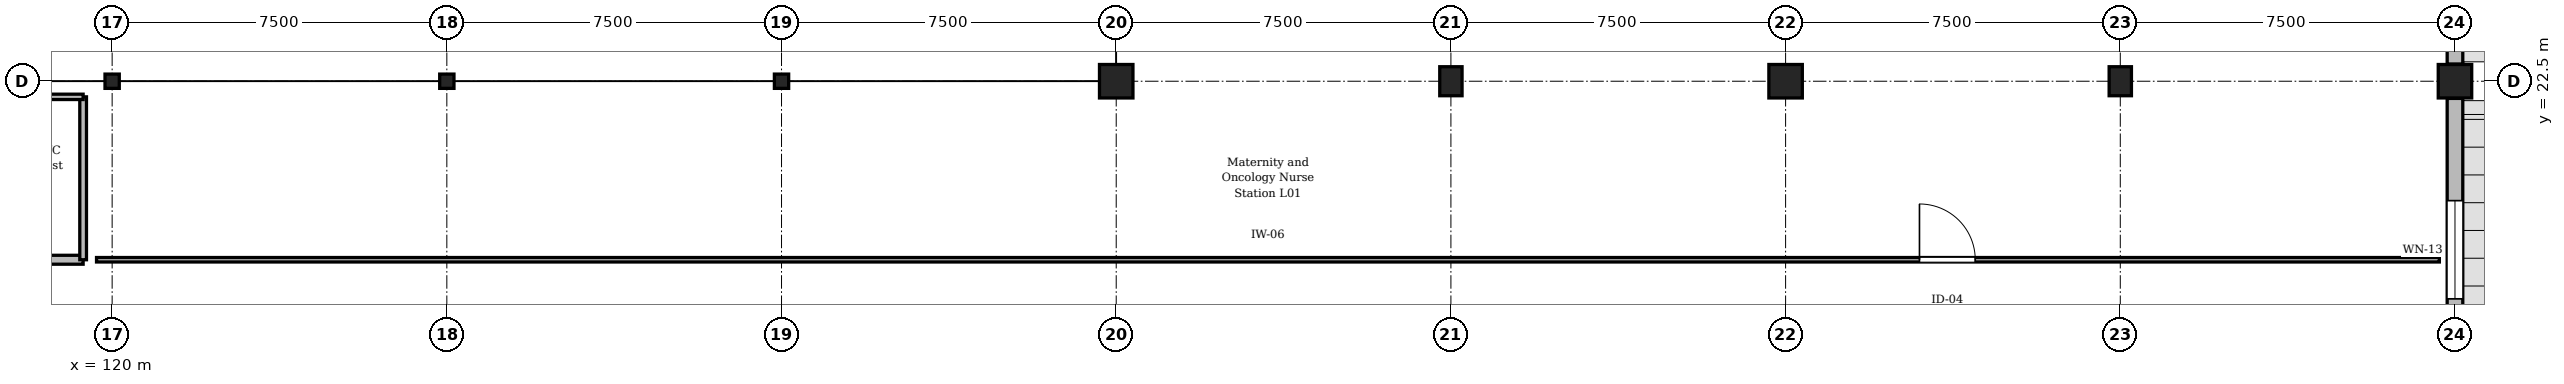
"""IFC4 building model, lengths in metres.
Left out: names, types, materials, properties, quantities, classifications, styles, units other than length and angle.
Written with IfcOpenShell. Run it as: python <this file> out.ifc"""

import sys

from ifc_helpers import new_model, si_unit, direction, frame, frame_2d, origin, origin_2d, place, context, subcontext, project, spatial, rectangle, extrude, element, fill, save


model = new_model("IFC4")
c1 = context("Model", 3, precision=1e-05, world=origin(), true_north=direction((0.0, 1.0)))
c2 = subcontext(c1, "Body", "Model", "MODEL_VIEW")
j1 = project(units=[si_unit("LENGTHUNIT", "METRE"), si_unit("PLANEANGLEUNIT", "RADIAN")], contexts=[c1])
p1 = place(None, origin())
s1 = spatial("IfcSite", under=j1, at=p1, CompositionType="ELEMENT")
p2 = place(p1, origin())
s2 = spatial("IfcBuilding", under=s1, at=p2, CompositionType="ELEMENT")
p3 = place(p2, frame((0.0, 0.0, 4.8)))
s3 = spatial("IfcBuildingStorey", under=s2, at=p3, CompositionType="ELEMENT", Elevation=4.8)
for number, where, z_axis, x_axis in (
    (1, (120.0, 22.5, 0.0), (0.0, 0.0, 1.0), (1.0, 0.0, 0.0)),
    (2, (127.5, 22.5, 0.0), (0.0, 0.0, 1.0), (1.0, 0.0, 0.0)),
    (3, (135.0, 22.5, 0.0), (0.0, 0.0, 1.0), (1.0, 0.0, 0.0)),
):
    element("IfcColumn", number, at=place(p3, frame(where, z_axis=z_axis, x_axis=x_axis)), inside=s3, PredefinedType="COLUMN", context=c2, shape_type="SweptSolid", body=[
        extrude(rectangle(XDim=0.32, YDim=0.32, at=origin_2d()), origin(), (0.0, 0.0, 1.0), 4.5),
    ])
p4 = place(p3, frame((142.5, 22.5, 0.0), z_axis=(0.0, 0.0, 1.0), x_axis=(1.0, 0.0, 0.0)))
e4 = element("IfcColumn", 4, at=p4, inside=s3, PredefinedType="COLUMN", context=c2, shape_type="SweptSolid", body=[
    extrude(rectangle(XDim=0.75, YDim=0.75, at=origin_2d()), origin(), (0.0, 0.0, 1.0), 4.5),
])
p5 = place(p3, frame((150.0, 22.5, 0.0), z_axis=(0.0, 0.0, 1.0), x_axis=(1.0, 0.0, 0.0)))
e5 = element("IfcColumn", 5, at=p5, inside=s3, PredefinedType="COLUMN", context=c2, shape_type="SweptSolid", body=[
    extrude(rectangle(XDim=0.5, YDim=0.65, at=origin_2d()), origin(), (0.0, 0.0, 1.0), 4.5),
])
p6 = place(p3, frame((157.5, 22.5, 0.0), z_axis=(0.0, 0.0, 1.0), x_axis=(1.0, 0.0, 0.0)))
e6 = element("IfcColumn", 6, at=p6, inside=s3, PredefinedType="COLUMN", context=c2, shape_type="SweptSolid", body=[
    extrude(rectangle(XDim=0.75, YDim=0.75, at=origin_2d()), origin(), (0.0, 0.0, 1.0), 4.5),
])
p7 = place(p3, frame((165.0, 22.5, 0.0), z_axis=(0.0, 0.0, 1.0), x_axis=(1.0, 0.0, 0.0)))
e7 = element("IfcColumn", 7, at=p7, inside=s3, PredefinedType="COLUMN", context=c2, shape_type="SweptSolid", body=[
    extrude(rectangle(XDim=0.5, YDim=0.65, at=origin_2d()), origin(), (0.0, 0.0, 1.0), 4.5),
])
p8 = place(p3, frame((172.5, 22.5, 0.0), z_axis=(0.0, 0.0, 1.0), x_axis=(1.0, 0.0, 0.0)))
e8 = element("IfcColumn", 8, at=p8, inside=s3, PredefinedType="COLUMN", context=c2, shape_type="SweptSolid", body=[
    extrude(rectangle(XDim=0.75, YDim=0.75, at=origin_2d()), origin(), (0.0, 0.0, 1.0), 4.5),
])
p9 = place(p3, frame((172.5, 22.115, 0.0), z_axis=(0.0, 0.0, 1.0), x_axis=(0.0, -1.0, 0.0)))
e9 = element("IfcWall", 9, at=p9, inside=s3, PredefinedType="STANDARD", context=c2, shape_type="SweptSolid", body=[
    extrude(rectangle(XDim=6.78, YDim=0.35, at=frame_2d((3.39, 0.0))), origin(), (0.0, 0.0, 1.0), 3.63),
])
p10 = place(p9, frame((2.29, 0.0, 0.9)))
e10 = element("IfcOpeningElement", 10, at=p10, cuts=e9, PredefinedType="OPENING", context=c2, shape_type="SweptSolid", body=[
    extrude(rectangle(XDim=2.2, YDim=1.95, at=frame_2d((1.1, 0.975))), frame((0.0, 0.185, 0.0), z_axis=(0.0, -1.0, 0.0), x_axis=(1.0, 0.0, 0.0)), (0.0, 0.0, 1.0), 0.37),
])
p11 = place(p3, frame((172.5, 31.165, 0.0), z_axis=(0.0, 0.0, 1.0), x_axis=(0.0, -1.0, 0.0)))
e11 = element("IfcWall", 11, at=p11, inside=s3, PredefinedType="STANDARD", context=c2, shape_type="SweptSolid", body=[
    extrude(rectangle(XDim=8.28, YDim=0.35, at=frame_2d((4.14, 0.0))), origin(), (0.0, 0.0, 1.0), 3.63),
])
p12 = place(p11, frame((3.44, 0.0, 0.9)))
e12 = element("IfcOpeningElement", 12, at=p12, cuts=e11, PredefinedType="OPENING", context=c2, shape_type="SweptSolid", body=[
    extrude(rectangle(XDim=1.4, YDim=1.8, at=frame_2d((0.7, 0.9))), frame((0.0, 0.185, 0.0), z_axis=(0.0, -1.0, 0.0), x_axis=(1.0, 0.0, 0.0)), (0.0, 0.0, 1.0), 0.37),
])
p13 = place(p3, frame((112.85, 18.5, 0.0), z_axis=(0.0, 0.0, 1.0), x_axis=(1.0, 0.0, 0.0)))
e13 = element("IfcWall", 13, at=p13, inside=s3, PredefinedType="STANDARD", context=c2, shape_type="SweptSolid", body=[
    extrude(rectangle(XDim=6.5, YDim=0.2, at=frame_2d((3.25, 0.0))), origin(), (0.0, 0.0, 1.0), 4.165),
])
p14 = place(p13, frame((2.775, 0.0, 0.0)))
e14 = element("IfcOpeningElement", 14, at=p14, cuts=e13, PredefinedType="OPENING", context=c2, shape_type="SweptSolid", body=[
    extrude(rectangle(XDim=0.95, YDim=2.15, at=frame_2d((0.475, 1.075))), frame((0.0, 0.11, 0.0), z_axis=(0.0, -1.0, 0.0), x_axis=(1.0, 0.0, 0.0)), (0.0, 0.0, 1.0), 0.22),
])
p15 = place(p3, frame((119.65, 18.5, 0.0), z_axis=(0.0, 0.0, 1.0), x_axis=(1.0, 0.0, 0.0)))
e15 = element("IfcWall", 15, at=p15, inside=s3, PredefinedType="PARTITIONING", context=c2, shape_type="SweptSolid", body=[
    extrude(rectangle(XDim=52.5, YDim=0.1, at=frame_2d((26.25, 0.0))), origin(), (0.0, 0.0, 1.0), 4.165),
])
p16 = place(p15, frame((40.85, 0.0, 0.0)))
e16 = element("IfcOpeningElement", 16, at=p16, cuts=e15, PredefinedType="OPENING", context=c2, shape_type="SweptSolid", body=[
    extrude(rectangle(XDim=1.25, YDim=2.2, at=frame_2d((0.625, 1.1))), frame((0.0, 0.06, 0.0), z_axis=(0.0, -1.0, 0.0), x_axis=(1.0, 0.0, 0.0)), (0.0, 0.0, 1.0), 0.12),
])
p17 = place(p3, frame((119.35, 18.5, 0.0), z_axis=(0.0, 0.0, 1.0), x_axis=(0.0, 1.0, 0.0)))
e17 = element("IfcWall", 17, at=p17, inside=s3, PredefinedType="PARTITIONING", context=c2, shape_type="SweptSolid", body=[
    extrude(rectangle(XDim=3.65, YDim=0.15, at=frame_2d((1.825, 0.0))), origin(), (0.0, 0.0, 1.0), 4.165),
])
p18 = place(p3, frame((112.85, 22.15, 0.0), z_axis=(0.0, 0.0, 1.0), x_axis=(1.0, 0.0, 0.0)))
e18 = element("IfcWall", 18, at=p18, inside=s3, PredefinedType="PARTITIONING", context=c2, shape_type="SweptSolid", body=[
    extrude(rectangle(XDim=6.5, YDim=0.12, at=frame_2d((3.25, 0.0))), origin(), (0.0, 0.0, 1.0), 3.565),
])
p19 = place(p10, origin())
e19 = element("IfcWindow", 19, at=p19, inside=s3, PartitioningType="SINGLE_PANEL", PredefinedType="WINDOW", context=c2, shape_type="SweptSolid", body=[
    extrude(rectangle(XDim=2.2, YDim=1.95, at=frame_2d((1.1, 0.975))), frame((0.0, 0.03, 0.0), z_axis=(0.0, -1.0, 0.0), x_axis=(1.0, 0.0, 0.0)), (0.0, 0.0, 1.0), 0.06),
])
fill(e10, e19)
p20 = place(p16, origin())
e20 = element("IfcDoor", 20, at=p20, inside=s3, OperationType="SINGLE_SWING_LEFT", PredefinedType="DOOR", context=c2, shape_type="SweptSolid", body=[
    extrude(rectangle(XDim=1.25, YDim=2.2, at=frame_2d((0.625, 1.1))), frame((0.0, 0.025, 0.0), z_axis=(0.0, -1.0, 0.0), x_axis=(1.0, 0.0, 0.0)), (0.0, 0.0, 1.0), 0.05),
])
fill(e16, e20)
save(model, sys.argv[1])
